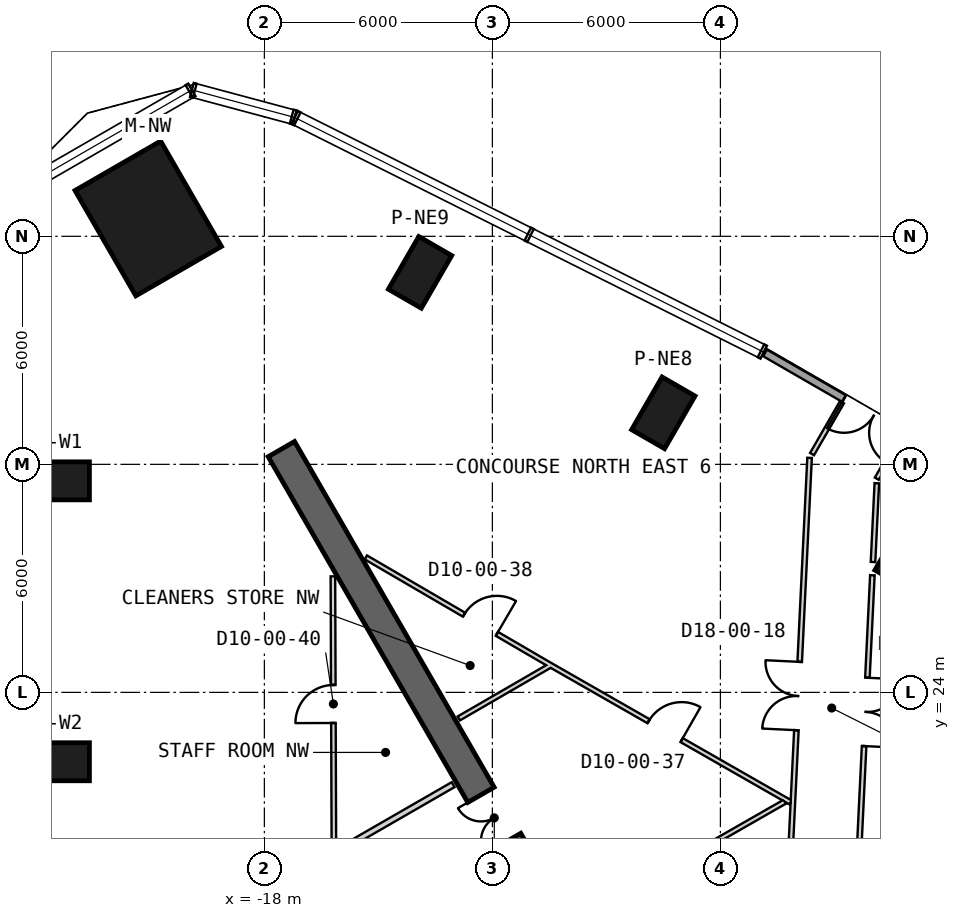
"""IFC4 building model, lengths in metres.
Left out: names, types, materials, properties, quantities, classifications, styles, units other than length and angle.
Written with IfcOpenShell. Run it as: python <this file> out.ifc"""

import sys

from ifc_helpers import new_model, si_unit, direction, frame, frame_2d, origin, origin_2d, place, context, subcontext, project, spatial, rectangle, extrude, element, fill, save


model = new_model("IFC4")
c1 = context("Model", 3, precision=1e-05, world=origin(), true_north=direction((0.0, 1.0)))
c2 = subcontext(c1, "Body", "Model", "MODEL_VIEW")
j1 = project(units=[si_unit("LENGTHUNIT", "METRE"), si_unit("PLANEANGLEUNIT", "RADIAN")], contexts=[c1])
p1 = place(None, origin())
s1 = spatial("IfcSite", under=j1, at=p1, CompositionType="ELEMENT")
p2 = place(p1, origin())
s2 = spatial("IfcBuilding", under=s1, at=p2, CompositionType="ELEMENT")
p3 = place(p2, origin())
s3 = spatial("IfcBuildingStorey", under=s2, at=p3, CompositionType="ELEMENT", Elevation=0.0)
p4 = place(p3, frame((-21.056, 36.469, 0.0), z_axis=(0.0, 0.0, 1.0), x_axis=(-0.5, 0.866025403784, 0.0)))
e1 = element("IfcColumn", 1, at=p4, inside=s3, PredefinedType="COLUMN", context=c2, shape_type="SweptSolid", body=[
    extrude(rectangle(XDim=3.2, YDim=2.6, at=origin_2d()), origin(), (0.0, 0.0, 1.0), 9.0),
])
for number, where, z_axis, x_axis in (
    (2, (-23.403, 29.566, 0.0), (0.0, 0.0, 1.0), (-1.0, 0.0, 0.0)),
    (3, (-23.403, 22.174, 0.0), (0.0, 0.0, 1.0), (-1.0, 0.0, 0.0)),
    (4, (-1.101, 27.659, 0.0), (0.0, 0.0, 1.0), (0.5, 0.866, 0.0)),
    (5, (-7.502, 31.355, 0.0), (0.0, 0.0, 1.0), (0.5, 0.866, 0.0)),
    (6, (-13.903, 35.051, 0.0), (0.0, 0.0, 1.0), (0.5, 0.866, 0.0)),
):
    element("IfcColumn", number, at=place(p3, frame(where, z_axis=z_axis, x_axis=x_axis)), inside=s3, PredefinedType="COLUMN", context=c2, shape_type="SweptSolid", body=[
        extrude(rectangle(XDim=1.6, YDim=1.0, at=origin_2d()), origin(), (0.0, 0.0, 1.0), 9.0),
    ])
p5 = place(p3, frame((-10.575, 18.316, 0.0), z_axis=(0.0, 0.0, 1.0), x_axis=(-0.499996575515, 0.866027380903, 0.0)))
e7 = element("IfcWall", 7, at=p5, inside=s3, PredefinedType="SHEAR", context=c2, shape_type="SweptSolid", body=[
    extrude(rectangle(XDim=13.954, YDim=0.8, at=frame_2d((6.977, 0.0))), origin(), (0.0, 0.0, 1.0), 9.0),
])
p6 = place(p5, frame((2.05, 0.0, 0.0)))
e8 = element("IfcOpeningElement", 8, at=p6, cuts=e7, PredefinedType="OPENING", context=c2, shape_type="SweptSolid", body=[
    extrude(rectangle(XDim=1.4, YDim=2.4, at=frame_2d((0.7, 1.2))), frame((0.0, 0.41, 0.0), z_axis=(0.0, -1.0, 0.0), x_axis=(1.0, 0.0, 0.0)), (0.0, 0.0, 1.0), 0.82),
])
p7 = place(p3, frame((0.895, 29.63, 0.0), z_axis=(0.0, 0.0, 1.0), x_axis=(-0.866064956285, 0.499931486801, 0.0)))
e9 = element("IfcWall", 9, at=p7, inside=s3, PredefinedType="SOLIDWALL", context=c2, shape_type="SweptSolid", body=[
    extrude(rectangle(XDim=6.605, YDim=0.2, at=frame_2d((3.303, 0.0))), origin(), (0.0, 0.0, 1.0), 8.7),
])
p8 = place(p7, frame((2.403, 0.0, 0.0)))
e10 = element("IfcOpeningElement", 10, at=p8, cuts=e9, PredefinedType="OPENING", context=c2, shape_type="SweptSolid", body=[
    extrude(rectangle(XDim=1.8, YDim=2.4, at=frame_2d((0.9, 1.2))), frame((0.0, 0.11, 0.0), z_axis=(0.0, -1.0, 0.0), x_axis=(1.0, 0.0, 0.0)), (0.0, 0.0, 1.0), 0.22),
])
p9 = place(p3, frame((-10.436, 24.731, 0.0), z_axis=(0.0, 0.0, 1.0), x_axis=(-0.865418403418, -0.501049884768, 0.0)))
e11 = element("IfcWall", 11, at=p9, inside=s3, PredefinedType="PARTITIONING", context=c2, shape_type="SweptSolid", body=[
    extrude(rectangle(XDim=2.828, YDim=0.12, at=frame_2d((1.414, 0.0))), origin(), (0.0, 0.0, 1.0), 8.7),
])
p10 = place(p3, frame((-10.492, 24.729, 0.0), z_axis=(0.0, 0.0, 1.0), x_axis=(0.868099034647, -0.496391041464, 0.0)))
e12 = element("IfcWall", 12, at=p10, inside=s3, PredefinedType="PARTITIONING", context=c2, shape_type="SweptSolid", body=[
    extrude(rectangle(XDim=7.3, YDim=0.12, at=frame_2d((3.65, 0.0))), origin(), (0.0, 0.0, 1.0), 7.78),
])
p11 = place(p10, frame((3.0, 0.0, 0.0)))
e13 = element("IfcOpeningElement", 13, at=p11, cuts=e12, PredefinedType="OPENING", context=c2, shape_type="SweptSolid", body=[
    extrude(rectangle(XDim=1.0, YDim=2.1, at=frame_2d((0.5, 1.05))), frame((0.0, 0.07, 0.0), z_axis=(0.0, -1.0, 0.0), x_axis=(1.0, 0.0, 0.0)), (0.0, 0.0, 1.0), 0.14),
])
p12 = place(p3, frame((-8.736, 18.588, 0.0), z_axis=(0.0, 0.0, 1.0), x_axis=(0.867892636673, 0.496751820539, 0.0)))
e14 = element("IfcWall", 14, at=p12, inside=s3, PredefinedType="PARTITIONING", context=c2, shape_type="SweptSolid", body=[
    extrude(rectangle(XDim=5.104, YDim=0.12, at=frame_2d((2.552, 0.0))), origin(), (0.0, 0.0, 1.0), 7.78),
])
p13 = place(p3, frame((-15.329, 27.551, 0.0), z_axis=(0.0, 0.0, 1.0), x_axis=(0.863752019717, -0.503917104725, 0.0)))
e15 = element("IfcWall", 15, at=p13, inside=s3, PredefinedType="PARTITIONING", context=c2, shape_type="SweptSolid", body=[
    extrude(rectangle(XDim=5.6, YDim=0.12, at=frame_2d((2.8, 0.0))), origin(), (0.0, 0.0, 1.0), 8.7),
])
p14 = place(p13, frame((2.992, 0.0, 0.0)))
e16 = element("IfcOpeningElement", 16, at=p14, cuts=e15, PredefinedType="OPENING", context=c2, shape_type="SweptSolid", body=[
    extrude(rectangle(XDim=1.0, YDim=2.1, at=frame_2d((0.5, 1.05))), frame((0.0, 0.07, 0.0), z_axis=(0.0, -1.0, 0.0), x_axis=(1.0, 0.0, 0.0)), (0.0, 0.0, 1.0), 0.14),
])
p15 = place(p3, frame((-13.032, 21.572, 0.0), z_axis=(0.0, 0.0, 1.0), x_axis=(-0.866491166515, -0.499192406143, 0.0)))
e17 = element("IfcWall", 17, at=p15, inside=s3, PredefinedType="PLUMBINGWALL", context=c2, shape_type="SweptSolid", body=[
    extrude(rectangle(XDim=3.656, YDim=0.15, at=frame_2d((1.828, 0.0))), origin(), (0.0, 0.0, 1.0), 7.78),
])
p16 = place(p3, frame((-16.17, 19.795, 0.0), z_axis=(0.0, 0.0, 1.0), x_axis=(-0.003632670279, 0.999993401832, 0.0)))
e18 = element("IfcWall", 18, at=p16, inside=s3, PredefinedType="PARTITIONING", context=c2, shape_type="SweptSolid", body=[
    extrude(rectangle(XDim=7.258, YDim=0.12, at=frame_2d((3.629, 0.0))), origin(), (0.0, 0.0, 1.0), 7.78),
])
p17 = place(p16, frame((3.4, 0.0, 0.0)))
e19 = element("IfcOpeningElement", 19, at=p17, cuts=e18, PredefinedType="OPENING", context=c2, shape_type="SweptSolid", body=[
    extrude(rectangle(XDim=1.0, YDim=2.1, at=frame_2d((0.5, 1.05))), frame((0.0, 0.07, 0.0), z_axis=(0.0, -1.0, 0.0), x_axis=(1.0, 0.0, 0.0)), (0.0, 0.0, 1.0), 0.14),
])
p18 = place(p3, frame((-1.236, 30.744, 0.0), z_axis=(0.0, 0.0, 1.0), x_axis=(-0.499885440202, -0.866091534813, 0.0)))
e20 = element("IfcWall", 20, at=p18, inside=s3, PredefinedType="PARTITIONING", context=c2, shape_type="SweptSolid", body=[
    extrude(rectangle(XDim=1.297, YDim=0.12, at=frame_2d((0.648, 0.0))), origin(), (0.0, 0.0, 1.0), 8.7),
])
p19 = place(p3, frame((-2.339, 20.091, 0.0), z_axis=(0.0, 0.0, 1.0), x_axis=(0.048382191757, 0.998828896018, 0.0)))
e21 = element("IfcWall", 21, at=p19, inside=s3, PredefinedType="PARTITIONING", context=c2, shape_type="SweptSolid", body=[
    extrude(rectangle(XDim=6.999, YDim=0.12, at=frame_2d((3.5, 0.0))), origin(), (0.0, 0.0, 1.0), 8.7),
])
p20 = place(p19, frame((2.499, 0.0, 0.0)))
e22 = element("IfcOpeningElement", 22, at=p20, cuts=e21, PredefinedType="OPENING", context=c2, shape_type="SweptSolid", body=[
    extrude(rectangle(XDim=1.8, YDim=2.1, at=frame_2d((0.9, 1.05))), frame((0.0, 0.07, 0.0), z_axis=(0.0, -1.0, 0.0), x_axis=(1.0, 0.0, 0.0)), (0.0, 0.0, 1.0), 0.14),
])
p21 = place(p3, frame((-1.984, 27.43, 0.0), z_axis=(0.0, 0.0, 1.0), x_axis=(0.048347587438, 0.998830571613, 0.0)))
e23 = element("IfcWall", 23, at=p21, inside=s3, PredefinedType="PARTITIONING", context=c2, shape_type="SweptSolid", body=[
    extrude(rectangle(XDim=2.075, YDim=0.12, at=frame_2d((1.038, 0.0))), origin(), (0.0, 0.0, 1.0), 8.7),
])
p22 = place(p3, frame((-3.653, 30.171, 0.0), z_axis=(0.0, 0.0, 1.0), x_axis=(-0.048366881974, -0.99882963749, 0.0)))
e24 = element("IfcWall", 24, at=p22, inside=s3, PredefinedType="PARTITIONING", context=c2, shape_type="SweptSolid", body=[
    extrude(rectangle(XDim=12.543, YDim=0.12, at=frame_2d((6.272, 0.0))), origin(), (0.0, 0.0, 1.0), 7.88),
])
p23 = place(p22, frame((5.375, 0.0, 0.0)))
e25 = element("IfcOpeningElement", 25, at=p23, cuts=e24, PredefinedType="OPENING", context=c2, shape_type="SweptSolid", body=[
    extrude(rectangle(XDim=1.8, YDim=2.1, at=frame_2d((0.9, 1.05))), frame((0.0, 0.07, 0.0), z_axis=(0.0, -1.0, 0.0), x_axis=(1.0, 0.0, 0.0)), (0.0, 0.0, 1.0), 0.14),
])
p24 = place(p3, frame((-2.795, 31.644, 0.0), z_axis=(0.0, 0.0, 1.0), x_axis=(-0.500011000363, -0.866019052629, 0.0)))
e26 = element("IfcWall", 26, at=p24, inside=s3, PredefinedType="PARTITIONING", context=c2, shape_type="SweptSolid", body=[
    extrude(rectangle(XDim=1.587, YDim=0.12, at=frame_2d((0.793, 0.0))), origin(), (0.0, 0.0, 1.0), 8.7),
])
p25 = place(p8, frame((1.8, 0.0, 0.0), z_axis=(0.0, 0.0, 1.0), x_axis=(-1.0, 0.0, 0.0)))
e27 = element("IfcDoor", 27, at=p25, inside=s3, OperationType="SINGLE_SWING_RIGHT", PredefinedType="DOOR", context=c2, shape_type="SweptSolid", body=[
    extrude(rectangle(XDim=1.8, YDim=2.4, at=frame_2d((0.9, 1.2))), frame((0.0, 0.025, 0.0), z_axis=(0.0, -1.0, 0.0), x_axis=(1.0, 0.0, 0.0)), (0.0, 0.0, 1.0), 0.05),
])
fill(e10, e27)
p26 = place(p23, origin())
e28 = element("IfcDoor", 28, at=p26, inside=s3, OperationType="DOUBLE_DOOR_SINGLE_SWING", PredefinedType="NOTDEFINED", context=c2, shape_type="SweptSolid", body=[
    extrude(rectangle(XDim=1.8, YDim=2.1, at=frame_2d((0.9, 1.05))), frame((0.0, 0.025, 0.0), z_axis=(0.0, -1.0, 0.0), x_axis=(1.0, 0.0, 0.0)), (0.0, 0.0, 1.0), 0.05),
])
fill(e25, e28)
p27 = place(p20, origin())
e29 = element("IfcDoor", 29, at=p27, inside=s3, OperationType="DOUBLE_DOOR_SINGLE_SWING", PredefinedType="NOTDEFINED", context=c2, shape_type="SweptSolid", body=[
    extrude(rectangle(XDim=1.8, YDim=2.1, at=frame_2d((0.9, 1.05))), frame((0.0, 0.025, 0.0), z_axis=(0.0, -1.0, 0.0), x_axis=(1.0, 0.0, 0.0)), (0.0, 0.0, 1.0), 0.05),
])
fill(e22, e29)
p28 = place(p11, origin())
e30 = element("IfcDoor", 30, at=p28, inside=s3, OperationType="SINGLE_SWING_RIGHT", PredefinedType="NOTDEFINED", context=c2, shape_type="SweptSolid", body=[
    extrude(rectangle(XDim=1.0, YDim=2.1, at=frame_2d((0.5, 1.05))), frame((0.0, 0.025, 0.0), z_axis=(0.0, -1.0, 0.0), x_axis=(1.0, 0.0, 0.0)), (0.0, 0.0, 1.0), 0.05),
])
fill(e13, e30)
p29 = place(p14, origin())
e31 = element("IfcDoor", 31, at=p29, inside=s3, OperationType="SINGLE_SWING_RIGHT", PredefinedType="NOTDEFINED", context=c2, shape_type="SweptSolid", body=[
    extrude(rectangle(XDim=1.0, YDim=2.1, at=frame_2d((0.5, 1.05))), frame((0.0, 0.025, 0.0), z_axis=(0.0, -1.0, 0.0), x_axis=(1.0, 0.0, 0.0)), (0.0, 0.0, 1.0), 0.05),
])
fill(e16, e31)
p30 = place(p17, origin())
e32 = element("IfcDoor", 32, at=p30, inside=s3, OperationType="SINGLE_SWING_LEFT", PredefinedType="NOTDEFINED", context=c2, shape_type="SweptSolid", body=[
    extrude(rectangle(XDim=1.0, YDim=2.1, at=frame_2d((0.5, 1.05))), frame((0.0, 0.025, 0.0), z_axis=(0.0, -1.0, 0.0), x_axis=(1.0, 0.0, 0.0)), (0.0, 0.0, 1.0), 0.05),
])
fill(e19, e32)
p31 = place(p6, origin())
e33 = element("IfcDoor", 33, at=p31, inside=s3, OperationType="DOUBLE_DOOR_SINGLE_SWING", PredefinedType="NOTDEFINED", context=c2, shape_type="SweptSolid", body=[
    extrude(rectangle(XDim=1.4, YDim=2.4, at=frame_2d((0.7, 1.2))), frame((0.0, 0.025, 0.0), z_axis=(0.0, -1.0, 0.0), x_axis=(1.0, 0.0, 0.0)), (0.0, 0.0, 1.0), 0.05),
])
fill(e8, e33)
save(model, sys.argv[1])
